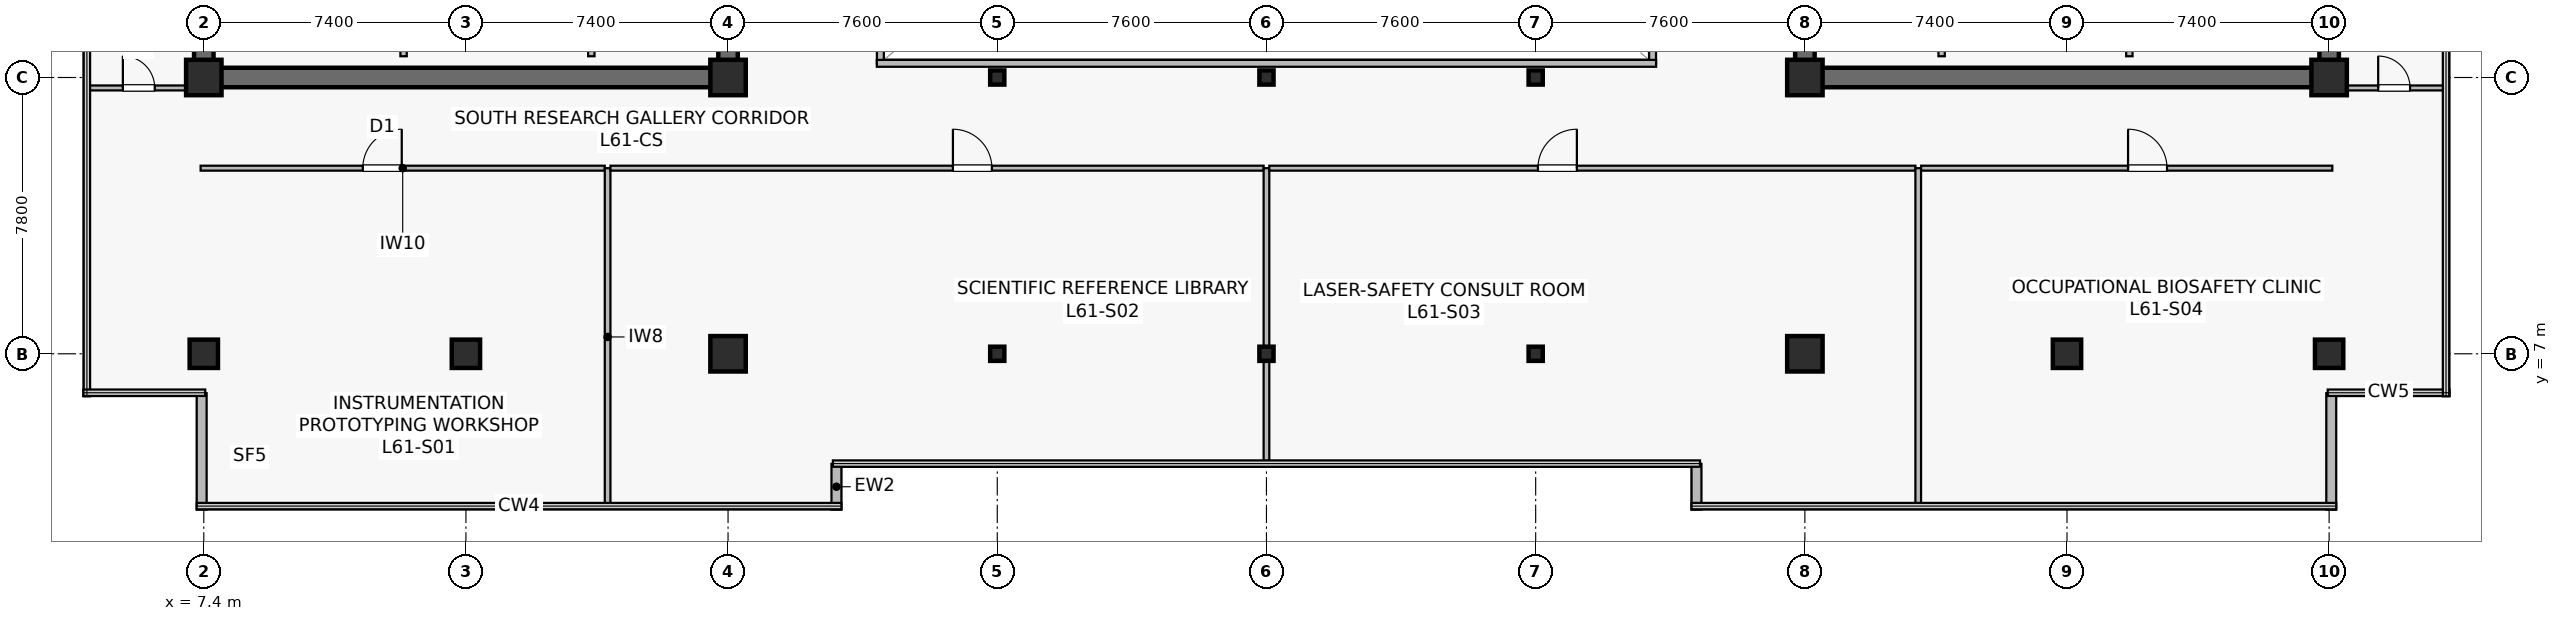
"""IFC4 building model, lengths in metres.
Left out: names, types, materials, properties, quantities, classifications, styles, units other than length and angle.
Written with IfcOpenShell. Run it as: python <this file> out.ifc"""

import sys

from ifc_helpers import new_model, si_unit, direction, frame, frame_2d, origin, origin_2d, place, context, subcontext, project, spatial, rectangle, hollow_rectangle, extrude, source, transform, mapped, element, fill, save


model = new_model("IFC4")
c1 = context("Model", 3, precision=1e-05, world=origin(), true_north=direction((0.0, 1.0)))
c2 = subcontext(c1, "Body", "Model", "MODEL_VIEW")
j1 = project(units=[si_unit("LENGTHUNIT", "METRE"), si_unit("PLANEANGLEUNIT", "RADIAN")], contexts=[c1])
p1 = place(None, origin())
s1 = spatial("IfcSite", under=j1, at=p1, CompositionType="ELEMENT")
p2 = place(p1, origin())
s2 = spatial("IfcBuilding", under=s1, at=p2, CompositionType="ELEMENT")
p3 = place(p2, frame((0.0, 0.0, 254.7)))
s3 = spatial("IfcBuildingStorey", under=s2, at=p3, CompositionType="ELEMENT", Elevation=254.7)
p4 = place(p3, frame((7.125, 14.8, 0.0), z_axis=(0.0, 0.0, 1.0), x_axis=(1.0, 0.0, 0.0)))
e1 = element("IfcWall", 1, at=p4, inside=s3, PredefinedType="SHEAR", context=c2, shape_type="SweptSolid", body=[
    extrude(rectangle(XDim=15.35, YDim=0.55, at=frame_2d((7.675, 0.0))), origin(), (0.0, 0.0, 1.0), 3.8),
])
p5 = place(p3, frame((7.4, 15.075, 0.0), z_axis=(0.0, 0.0, 1.0), x_axis=(0.0, 1.0, 0.0)))
e2 = element("IfcWall", 2, at=p5, inside=s3, PredefinedType="SHEAR", context=c2, shape_type="SweptSolid", body=[
    extrude(rectangle(XDim=18.45, YDim=0.55, at=frame_2d((9.225, 0.0))), origin(), (0.0, 0.0, 1.0), 3.8),
])
p6 = place(p3, frame((22.2, 15.075, 0.0), z_axis=(0.0, 0.0, 1.0), x_axis=(0.0, 1.0, 0.0)))
e3 = element("IfcWall", 3, at=p6, inside=s3, PredefinedType="SHEAR", context=c2, shape_type="SweptSolid", body=[
    extrude(rectangle(XDim=18.45, YDim=0.55, at=frame_2d((9.225, 0.0))), origin(), (0.0, 0.0, 1.0), 3.8),
])
p7 = place(p6, frame((3.475, 0.0, 0.0)))
e4 = element("IfcOpeningElement", 4, at=p7, cuts=e3, PredefinedType="OPENING", context=c2, shape_type="SweptSolid", body=[
    extrude(rectangle(XDim=1.42, YDim=2.2, at=frame_2d((0.71, 1.1))), frame((0.0, 0.285, 0.0), z_axis=(0.0, -1.0, 0.0), x_axis=(1.0, 0.0, 0.0)), (0.0, 0.0, 1.0), 0.57),
])
p8 = place(p3, frame((52.325, 14.8, 0.0), z_axis=(0.0, 0.0, 1.0), x_axis=(1.0, 0.0, 0.0)))
e5 = element("IfcWall", 5, at=p8, inside=s3, PredefinedType="SHEAR", context=c2, shape_type="SweptSolid", body=[
    extrude(rectangle(XDim=15.35, YDim=0.55, at=frame_2d((7.675, 0.0))), origin(), (0.0, 0.0, 1.0), 3.8),
])
p9 = place(p3, frame((52.6, 15.075, 0.0), z_axis=(0.0, 0.0, 1.0), x_axis=(0.0, 1.0, 0.0)))
e6 = element("IfcWall", 6, at=p9, inside=s3, PredefinedType="SHEAR", context=c2, shape_type="SweptSolid", body=[
    extrude(rectangle(XDim=18.45, YDim=0.55, at=frame_2d((9.225, 0.0))), origin(), (0.0, 0.0, 1.0), 3.8),
])
p10 = place(p9, frame((3.475, 0.0, 0.0)))
e7 = element("IfcOpeningElement", 7, at=p10, cuts=e6, PredefinedType="OPENING", context=c2, shape_type="SweptSolid", body=[
    extrude(rectangle(XDim=1.42, YDim=2.2, at=frame_2d((0.71, 1.1))), frame((0.0, 0.285, 0.0), z_axis=(0.0, -1.0, 0.0), x_axis=(1.0, 0.0, 0.0)), (0.0, 0.0, 1.0), 0.57),
])
p11 = place(p3, frame((67.4, 15.075, 0.0), z_axis=(0.0, 0.0, 1.0), x_axis=(0.0, 1.0, 0.0)))
e8 = element("IfcWall", 8, at=p11, inside=s3, PredefinedType="SHEAR", context=c2, shape_type="SweptSolid", body=[
    extrude(rectangle(XDim=18.45, YDim=0.55, at=frame_2d((9.225, 0.0))), origin(), (0.0, 0.0, 1.0), 3.8),
])
m1 = source(origin(), c2, "Body", "SweptSolid", [
    extrude(rectangle(XDim=0.8, YDim=0.8, at=origin_2d()), origin(), (0.0, 0.0, 1.0), 4.1),
])
p12 = place(p3, frame((14.8, 7.0, 0.0), z_axis=(0.0, 0.0, 1.0), x_axis=(1.0, 0.0, 0.0)))
e9 = element("IfcColumn", 9, at=p12, inside=s3, PredefinedType="COLUMN", context=c2, shape_type="MappedRepresentation", body=[
    mapped(m1, transform((0.0, 0.0, 0.0), scale=1.0)),
])
m2 = source(origin(), c2, "Body", "SweptSolid", [
    extrude(rectangle(XDim=1.0, YDim=1.0, at=origin_2d()), origin(), (0.0, 0.0, 1.0), 4.1),
])
for number, where, z_axis, x_axis in (
    (10, (22.2, 7.0, 0.0), (0.0, 0.0, 1.0), (1.0, 0.0, 0.0)),
    (11, (7.4, 14.8, 0.0), (0.0, 0.0, 1.0), (1.0, 0.0, 0.0)),
    (12, (22.2, 14.8, 0.0), (0.0, 0.0, 1.0), (1.0, 0.0, 0.0)),
    (13, (52.6, 7.0, 0.0), (0.0, 0.0, 1.0), (1.0, 0.0, 0.0)),
):
    element("IfcColumn", number, at=place(p3, frame(where, z_axis=z_axis, x_axis=x_axis)), inside=s3, PredefinedType="COLUMN", context=c2, shape_type="MappedRepresentation", body=[
        mapped(m2, transform((0.0, 0.0, 0.0), scale=1.0)),
    ])
p13 = place(p3, frame((60.0, 7.0, 0.0), z_axis=(0.0, 0.0, 1.0), x_axis=(1.0, 0.0, 0.0)))
e14 = element("IfcColumn", 14, at=p13, inside=s3, PredefinedType="COLUMN", context=c2, shape_type="MappedRepresentation", body=[
    mapped(m1, transform((0.0, 0.0, 0.0), scale=1.0)),
])
for number, where, z_axis, x_axis in (
    (15, (52.6, 14.8, 0.0), (0.0, 0.0, 1.0), (1.0, 0.0, 0.0)),
    (16, (67.4, 14.8, 0.0), (0.0, 0.0, 1.0), (1.0, 0.0, 0.0)),
):
    element("IfcColumn", number, at=place(p3, frame(where, z_axis=z_axis, x_axis=x_axis)), inside=s3, PredefinedType="COLUMN", context=c2, shape_type="MappedRepresentation", body=[
        mapped(m2, transform((0.0, 0.0, 0.0), scale=1.0)),
    ])
for number, where, z_axis, x_axis in (
    (17, (7.4, 7.0, 0.0), (0.0, 0.0, 1.0), (1.0, 0.0, 0.0)),
    (18, (67.4, 7.0, 0.0), (0.0, 0.0, 1.0), (1.0, 0.0, 0.0)),
):
    element("IfcColumn", number, at=place(p3, frame(where, z_axis=z_axis, x_axis=x_axis)), inside=s3, PredefinedType="COLUMN", context=c2, shape_type="MappedRepresentation", body=[
        mapped(m1, transform((0.0, 0.0, 0.0), scale=1.0)),
    ])
m3 = source(origin(), c2, "Body", "SweptSolid", [
    extrude(hollow_rectangle(XDim=0.4, YDim=0.4, WallThickness=0.019, at=origin_2d()), origin(), (0.0, 0.0, 1.0), 4.1),
])
for number, where, z_axis, x_axis in (
    (19, (29.8, 7.0, 0.0), (0.0, 0.0, 1.0), (1.0, 0.0, 0.0)),
    (20, (29.8, 14.8, 0.0), (0.0, 0.0, 1.0), (1.0, 0.0, 0.0)),
    (21, (37.4, 7.0, 0.0), (0.0, 0.0, 1.0), (1.0, 0.0, 0.0)),
    (22, (37.4, 14.8, 0.0), (0.0, 0.0, 1.0), (1.0, 0.0, 0.0)),
    (23, (45.0, 7.0, 0.0), (0.0, 0.0, 1.0), (1.0, 0.0, 0.0)),
    (24, (45.0, 14.8, 0.0), (0.0, 0.0, 1.0), (1.0, 0.0, 0.0)),
):
    element("IfcColumn", number, at=place(p3, frame(where, z_axis=z_axis, x_axis=x_axis)), inside=s3, PredefinedType="COLUMN", context=c2, shape_type="MappedRepresentation", body=[
        mapped(m3, transform((0.0, 0.0, 0.0), scale=1.0)),
    ])
for number, where, z_axis, x_axis in (
    (25, (25.26, 2.6, 0.0), (0.0, 0.0, 1.0), (0.0, 1.0, 0.0)),
    (26, (49.54, 3.893, 0.0), (0.0, 0.0, 1.0), (0.0, -1.0, 0.0)),
):
    element("IfcWall", number, at=place(p3, frame(where, z_axis=z_axis, x_axis=x_axis)), inside=s3, PredefinedType="STANDARD", context=c2, shape_type="SweptSolid", body=[
        extrude(rectangle(XDim=1.293, YDim=0.28, at=frame_2d((0.646, 0.0))), origin(), (0.0, 0.0, 1.0), 3.8),
    ])
for number, where, z_axis, x_axis in (
    (27, (67.46, 2.6, 0.0), (0.0, 0.0, 1.0), (0.0, 1.0, 0.0)),
    (28, (7.34, 5.888, 0.0), (0.0, 0.0, 1.0), (0.0, -1.0, 0.0)),
):
    element("IfcWall", number, at=place(p3, frame(where, z_axis=z_axis, x_axis=x_axis)), inside=s3, PredefinedType="STANDARD", context=c2, shape_type="SweptSolid", body=[
        extrude(rectangle(XDim=3.288, YDim=0.28, at=frame_2d((1.644, 0.0))), origin(), (0.0, 0.0, 1.0), 3.8),
    ])
for number, where, z_axis, x_axis in (
    (29, (13.04, 15.4, 0.0), (0.0, 0.0, 1.0), (0.0, 1.0, 0.0)),
    (30, (18.34, 15.4, 0.0), (0.0, 0.0, 1.0), (0.0, 1.0, 0.0)),
    (31, (61.76, 15.4, 0.0), (0.0, 0.0, 1.0), (0.0, 1.0, 0.0)),
    (32, (56.46, 15.4, 0.0), (0.0, 0.0, 1.0), (0.0, 1.0, 0.0)),
):
    element("IfcWall", number, at=place(p3, frame(where, z_axis=z_axis, x_axis=x_axis)), inside=s3, PredefinedType="SOLIDWALL", context=c2, shape_type="SweptSolid", body=[
        extrude(rectangle(XDim=2.4, YDim=0.18, at=frame_2d((1.2, 0.0))), origin(), (0.0, 0.0, 1.0), 3.8),
    ])
p14 = place(p3, frame((26.5, 15.2, 0.0), z_axis=(0.0, 0.0, 1.0), x_axis=(0.0, 1.0, 0.0)))
e33 = element("IfcWall", 33, at=p14, inside=s3, PredefinedType="SOLIDWALL", context=c2, shape_type="SweptSolid", body=[
    extrude(rectangle(XDim=18.2, YDim=0.195, at=frame_2d((9.1, 0.0))), origin(), (0.0, 0.0, 1.0), 3.8),
])
p15 = place(p14, frame((1.8, 0.0, 0.9)))
e34 = element("IfcOpeningElement", 34, at=p15, cuts=e33, PredefinedType="OPENING", context=c2, shape_type="SweptSolid", body=[
    extrude(rectangle(XDim=1.2, YDim=1.35, at=frame_2d((0.6, 0.675))), frame((0.0, 0.107, 0.0), z_axis=(0.0, -1.0, 0.0), x_axis=(1.0, 0.0, 0.0)), (0.0, 0.0, 1.0), 0.215),
])
p16 = place(p14, frame((13.2, 0.0, 0.9)))
e35 = element("IfcOpeningElement", 35, at=p16, cuts=e33, PredefinedType="OPENING", context=c2, shape_type="SweptSolid", body=[
    extrude(rectangle(XDim=1.2, YDim=1.35, at=frame_2d((0.6, 0.675))), frame((0.0, 0.107, 0.0), z_axis=(0.0, -1.0, 0.0), x_axis=(1.0, 0.0, 0.0)), (0.0, 0.0, 1.0), 0.215),
])
p17 = place(p3, frame((48.3, 15.2, 0.0), z_axis=(0.0, 0.0, 1.0), x_axis=(0.0, 1.0, 0.0)))
e36 = element("IfcWall", 36, at=p17, inside=s3, PredefinedType="SOLIDWALL", context=c2, shape_type="SweptSolid", body=[
    extrude(rectangle(XDim=18.2, YDim=0.195, at=frame_2d((9.1, 0.0))), origin(), (0.0, 0.0, 1.0), 3.8),
])
p18 = place(p17, frame((1.8, 0.0, 0.9)))
e37 = element("IfcOpeningElement", 37, at=p18, cuts=e36, PredefinedType="OPENING", context=c2, shape_type="SweptSolid", body=[
    extrude(rectangle(XDim=1.2, YDim=1.35, at=frame_2d((0.6, 0.675))), frame((0.0, 0.107, 0.0), z_axis=(0.0, -1.0, 0.0), x_axis=(1.0, 0.0, 0.0)), (0.0, 0.0, 1.0), 0.215),
])
p19 = place(p17, frame((13.2, 0.0, 0.9)))
e38 = element("IfcOpeningElement", 38, at=p19, cuts=e36, PredefinedType="OPENING", context=c2, shape_type="SweptSolid", body=[
    extrude(rectangle(XDim=1.2, YDim=1.35, at=frame_2d((0.6, 0.675))), frame((0.0, 0.107, 0.0), z_axis=(0.0, -1.0, 0.0), x_axis=(1.0, 0.0, 0.0)), (0.0, 0.0, 1.0), 0.215),
])
p20 = place(p3, frame((26.4, 15.2, 0.0), z_axis=(0.0, 0.0, 1.0), x_axis=(1.0, 0.0, 0.0)))
e39 = element("IfcWall", 39, at=p20, inside=s3, PredefinedType="SOLIDWALL", context=c2, shape_type="SweptSolid", body=[
    extrude(rectangle(XDim=22.0, YDim=0.195, at=frame_2d((11.0, 0.0))), origin(), (0.0, 0.0, 1.0), 3.8),
])
p21 = place(p3, frame((7.31, 12.24, 0.0), z_axis=(0.0, 0.0, 1.0), x_axis=(1.0, 0.0, 0.0)))
e40 = element("IfcWall", 40, at=p21, inside=s3, PredefinedType="PARTITIONING", context=c2, shape_type="SweptSolid", body=[
    extrude(rectangle(XDim=11.41, YDim=0.14, at=frame_2d((5.705, 0.0))), origin(), (0.0, 0.0, 1.0), 3.197),
])
p22 = place(p21, frame((4.578, 0.0, 0.0)))
e41 = element("IfcOpeningElement", 41, at=p22, cuts=e40, PredefinedType="OPENING", context=c2, shape_type="SweptSolid", body=[
    extrude(rectangle(XDim=1.1, YDim=2.18, at=frame_2d((0.55, 1.09))), frame((0.0, 0.08, 0.0), z_axis=(0.0, -1.0, 0.0), x_axis=(1.0, 0.0, 0.0)), (0.0, 0.0, 1.0), 0.16),
])
p23 = place(p3, frame((18.8, 2.71, 0.0), z_axis=(0.0, 0.0, 1.0), x_axis=(0.0, 1.0, 0.0)))
e42 = element("IfcWall", 42, at=p23, inside=s3, PredefinedType="PARTITIONING", context=c2, shape_type="SweptSolid", body=[
    extrude(rectangle(XDim=9.53, YDim=0.16, at=frame_2d((4.765, 0.0))), origin(), (0.0, 0.0, 1.0), 3.135),
])
p24 = place(p3, frame((18.88, 12.24, 0.0), z_axis=(0.0, 0.0, 1.0), x_axis=(1.0, 0.0, 0.0)))
e43 = element("IfcWall", 43, at=p24, inside=s3, PredefinedType="PARTITIONING", context=c2, shape_type="SweptSolid", body=[
    extrude(rectangle(XDim=18.44, YDim=0.14, at=frame_2d((9.22, 0.0))), origin(), (0.0, 0.0, 1.0), 3.197),
])
p25 = place(p24, frame((9.668, 0.0, 0.0)))
e44 = element("IfcOpeningElement", 44, at=p25, cuts=e43, PredefinedType="OPENING", context=c2, shape_type="SweptSolid", body=[
    extrude(rectangle(XDim=1.1, YDim=2.18, at=frame_2d((0.55, 1.09))), frame((0.0, 0.08, 0.0), z_axis=(0.0, -1.0, 0.0), x_axis=(1.0, 0.0, 0.0)), (0.0, 0.0, 1.0), 0.16),
])
p26 = place(p3, frame((37.4, 3.91, 0.0), z_axis=(0.0, 0.0, 1.0), x_axis=(0.0, 1.0, 0.0)))
e45 = element("IfcWall", 45, at=p26, inside=s3, PredefinedType="PARTITIONING", context=c2, shape_type="SweptSolid", body=[
    extrude(rectangle(XDim=8.33, YDim=0.16, at=frame_2d((4.165, 0.0))), origin(), (0.0, 0.0, 1.0), 3.135),
])
p27 = place(p3, frame((37.48, 12.24, 0.0), z_axis=(0.0, 0.0, 1.0), x_axis=(1.0, 0.0, 0.0)))
e46 = element("IfcWall", 46, at=p27, inside=s3, PredefinedType="PARTITIONING", context=c2, shape_type="SweptSolid", body=[
    extrude(rectangle(XDim=18.24, YDim=0.14, at=frame_2d((9.12, 0.0))), origin(), (0.0, 0.0, 1.0), 3.197),
])
p28 = place(p27, frame((7.583, 0.0, 0.0)))
e47 = element("IfcOpeningElement", 47, at=p28, cuts=e46, PredefinedType="OPENING", context=c2, shape_type="SweptSolid", body=[
    extrude(rectangle(XDim=1.1, YDim=2.18, at=frame_2d((0.55, 1.09))), frame((0.0, 0.08, 0.0), z_axis=(0.0, -1.0, 0.0), x_axis=(1.0, 0.0, 0.0)), (0.0, 0.0, 1.0), 0.16),
])
p29 = place(p3, frame((55.8, 2.71, 0.0), z_axis=(0.0, 0.0, 1.0), x_axis=(0.0, 1.0, 0.0)))
e48 = element("IfcWall", 48, at=p29, inside=s3, PredefinedType="PARTITIONING", context=c2, shape_type="SweptSolid", body=[
    extrude(rectangle(XDim=9.53, YDim=0.16, at=frame_2d((4.765, 0.0))), origin(), (0.0, 0.0, 1.0), 3.135),
])
p30 = place(p3, frame((55.88, 12.24, 0.0), z_axis=(0.0, 0.0, 1.0), x_axis=(1.0, 0.0, 0.0)))
e49 = element("IfcWall", 49, at=p30, inside=s3, PredefinedType="PARTITIONING", context=c2, shape_type="SweptSolid", body=[
    extrude(rectangle(XDim=11.61, YDim=0.14, at=frame_2d((5.805, 0.0))), origin(), (0.0, 0.0, 1.0), 3.197),
])
p31 = place(p30, frame((5.844, 0.0, 0.0)))
e50 = element("IfcOpeningElement", 50, at=p31, cuts=e49, PredefinedType="OPENING", context=c2, shape_type="SweptSolid", body=[
    extrude(rectangle(XDim=1.1, YDim=2.18, at=frame_2d((0.55, 1.09))), frame((0.0, 0.08, 0.0), z_axis=(0.0, -1.0, 0.0), x_axis=(1.0, 0.0, 0.0)), (0.0, 0.0, 1.0), 0.16),
])
p32 = place(p3, frame((4.11, 14.505, 0.0), z_axis=(0.0, 0.0, 1.0), x_axis=(1.0, 0.0, 0.0)))
e51 = element("IfcWall", 51, at=p32, inside=s3, PredefinedType="PARTITIONING", context=c2, shape_type="SweptSolid", body=[
    extrude(rectangle(XDim=2.91, YDim=0.14, at=frame_2d((1.455, 0.0))), origin(), (0.0, 0.0, 1.0), 3.8),
])
p33 = place(p32, frame((1.005, 0.0, 0.0)))
e52 = element("IfcOpeningElement", 52, at=p33, cuts=e51, PredefinedType="OPENING", context=c2, shape_type="SweptSolid", body=[
    extrude(rectangle(XDim=0.9, YDim=2.1, at=frame_2d((0.45, 1.05))), frame((0.0, 0.08, 0.0), z_axis=(0.0, -1.0, 0.0), x_axis=(1.0, 0.0, 0.0)), (0.0, 0.0, 1.0), 0.16),
])
p34 = place(p3, frame((67.78, 14.505, 0.0), z_axis=(0.0, 0.0, 1.0), x_axis=(1.0, 0.0, 0.0)))
e53 = element("IfcWall", 53, at=p34, inside=s3, PredefinedType="PARTITIONING", context=c2, shape_type="SweptSolid", body=[
    extrude(rectangle(XDim=2.91, YDim=0.14, at=frame_2d((1.455, 0.0))), origin(), (0.0, 0.0, 1.0), 3.8),
])
p35 = place(p34, frame((1.005, 0.0, 0.0)))
e54 = element("IfcOpeningElement", 54, at=p35, cuts=e53, PredefinedType="OPENING", context=c2, shape_type="SweptSolid", body=[
    extrude(rectangle(XDim=0.9, YDim=2.1, at=frame_2d((0.45, 1.05))), frame((0.0, 0.08, 0.0), z_axis=(0.0, -1.0, 0.0), x_axis=(1.0, 0.0, 0.0)), (0.0, 0.0, 1.0), 0.16),
])
m4 = source(origin(), c2, "Body", "SweptSolid", [
    extrude(rectangle(XDim=1.1, YDim=2.18, at=frame_2d((0.55, 1.09))), frame((0.0, 0.025, 0.0), z_axis=(0.0, -1.0, 0.0), x_axis=(1.0, 0.0, 0.0)), (0.0, 0.0, 1.0), 0.05),
])
p36 = place(p22, origin())
e55 = element("IfcDoor", 55, at=p36, inside=s3, OperationType="SINGLE_SWING_RIGHT", PredefinedType="DOOR", context=c2, shape_type="MappedRepresentation", body=[
    mapped(m4, transform((0.0, 0.0, 0.0), scale=1.0)),
])
fill(e41, e55)
p37 = place(p25, origin())
e56 = element("IfcDoor", 56, at=p37, inside=s3, OperationType="SINGLE_SWING_LEFT", PredefinedType="DOOR", context=c2, shape_type="MappedRepresentation", body=[
    mapped(m4, transform((0.0, 0.0, 0.0), scale=1.0)),
])
fill(e44, e56)
p38 = place(p28, origin())
e57 = element("IfcDoor", 57, at=p38, inside=s3, OperationType="SINGLE_SWING_RIGHT", PredefinedType="DOOR", context=c2, shape_type="MappedRepresentation", body=[
    mapped(m4, transform((0.0, 0.0, 0.0), scale=1.0)),
])
fill(e47, e57)
p39 = place(p31, origin())
e58 = element("IfcDoor", 58, at=p39, inside=s3, OperationType="SINGLE_SWING_LEFT", PredefinedType="DOOR", context=c2, shape_type="MappedRepresentation", body=[
    mapped(m4, transform((0.0, 0.0, 0.0), scale=1.0)),
])
fill(e50, e58)
m5 = source(origin(), c2, "Body", "SweptSolid", [
    extrude(rectangle(XDim=0.9, YDim=2.1, at=frame_2d((0.45, 1.05))), frame((0.0, 0.025, 0.0), z_axis=(0.0, -1.0, 0.0), x_axis=(1.0, 0.0, 0.0)), (0.0, 0.0, 1.0), 0.05),
])
p40 = place(p33, origin())
e59 = element("IfcDoor", 59, at=p40, inside=s3, OperationType="SINGLE_SWING_LEFT", PredefinedType="DOOR", context=c2, shape_type="MappedRepresentation", body=[
    mapped(m5, transform((0.0, 0.0, 0.0), scale=1.0)),
])
fill(e52, e59)
p41 = place(p35, origin())
e60 = element("IfcDoor", 60, at=p41, inside=s3, OperationType="SINGLE_SWING_LEFT", PredefinedType="DOOR", context=c2, shape_type="MappedRepresentation", body=[
    mapped(m5, transform((0.0, 0.0, 0.0), scale=1.0)),
])
fill(e54, e60)
save(model, sys.argv[1])
